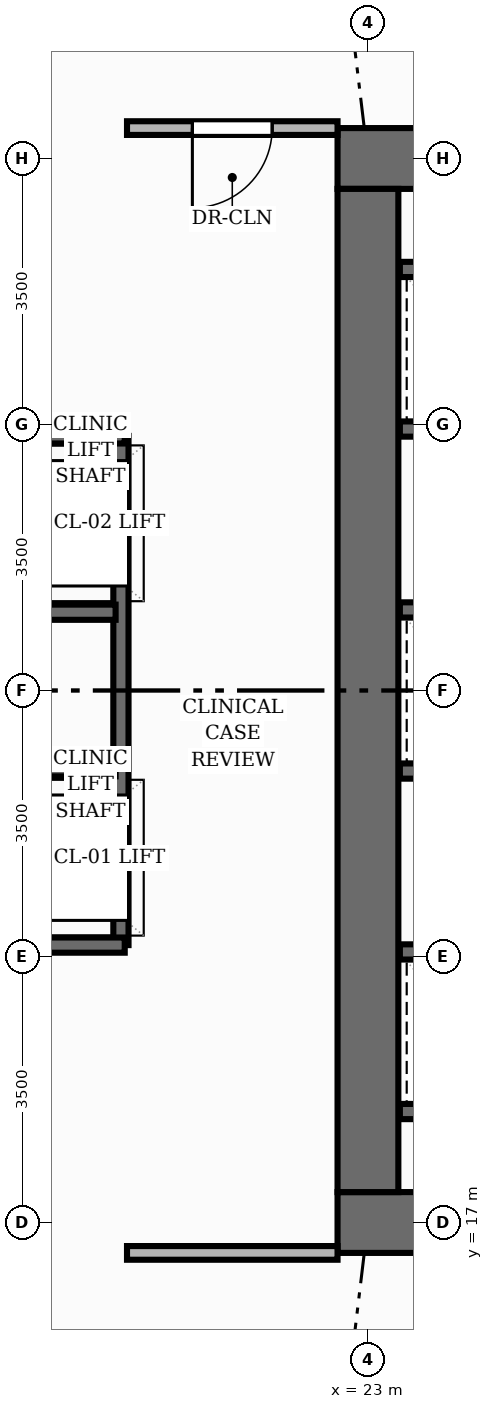
"""IFC4 building model, lengths in metres.
Left out: names, types, materials, properties, quantities, classifications, styles, units other than length and angle.
Written with IfcOpenShell. Run it as: python <this file> out.ifc"""

import sys

from ifc_helpers import new_model, si_unit, direction, frame, frame_2d, origin, place, context, subcontext, project, spatial, rectangle, extrude, element, fill, save


model = new_model("IFC4")
c1 = context("Model", 3, precision=1e-05, world=origin(), true_north=direction((0.0, 1.0)))
c2 = subcontext(c1, "Body", "Model", "MODEL_VIEW")
j1 = project(units=[si_unit("LENGTHUNIT", "METRE"), si_unit("PLANEANGLEUNIT", "RADIAN")], contexts=[c1])
p1 = place(None, origin())
s1 = spatial("IfcSite", under=j1, at=p1, CompositionType="ELEMENT")
p2 = place(p1, origin())
s2 = spatial("IfcBuilding", under=s1, at=p2, CompositionType="ELEMENT")
p3 = place(p2, frame((0.0, 0.0, 20.0)))
s3 = spatial("IfcBuildingStorey", under=s2, at=p3, CompositionType="ELEMENT", Elevation=20.0)
p4 = place(p3, frame((22.6, 17.0, 0.0), z_axis=(0.0, 0.0, 1.0), x_axis=(1.0, 0.0, 0.0)))
e1 = element("IfcWall", 1, at=p4, inside=s3, PredefinedType="SHEAR", context=c2, shape_type="SweptSolid", body=[
    extrude(rectangle(XDim=18.8, YDim=0.8, at=frame_2d((9.4, 0.0))), origin(), (0.0, 0.0, 1.0), 4.8),
])
p5 = place(p4, frame((5.9, 0.0, 0.0)))
e2 = element("IfcOpeningElement", 2, at=p5, cuts=e1, PredefinedType="OPENING", context=c2, shape_type="SweptSolid", body=[
    extrude(rectangle(XDim=1.1, YDim=2.15, at=frame_2d((0.55, 1.075))), frame((0.0, 0.41, 0.0), z_axis=(0.0, -1.0, 0.0), x_axis=(1.0, 0.0, 0.0)), (0.0, 0.0, 1.0), 0.82),
])
p6 = place(p4, frame((9.45, 0.0, 0.0)))
e3 = element("IfcOpeningElement", 3, at=p6, cuts=e1, PredefinedType="OPENING", context=c2, shape_type="SweptSolid", body=[
    extrude(rectangle(XDim=0.9, YDim=2.1, at=frame_2d((0.45, 1.05))), frame((0.0, 0.41, 0.0), z_axis=(0.0, -1.0, 0.0), x_axis=(1.0, 0.0, 0.0)), (0.0, 0.0, 1.0), 0.82),
])
p7 = place(p3, frame((22.6, 31.0, 0.0), z_axis=(0.0, 0.0, 1.0), x_axis=(1.0, 0.0, 0.0)))
e4 = element("IfcWall", 4, at=p7, inside=s3, PredefinedType="SHEAR", context=c2, shape_type="SweptSolid", body=[
    extrude(rectangle(XDim=18.8, YDim=0.8, at=frame_2d((9.4, 0.0))), origin(), (0.0, 0.0, 1.0), 4.8),
])
p8 = place(p7, frame((11.8, 0.0, 0.0)))
e5 = element("IfcOpeningElement", 5, at=p8, cuts=e4, PredefinedType="OPENING", context=c2, shape_type="SweptSolid", body=[
    extrude(rectangle(XDim=1.1, YDim=2.15, at=frame_2d((0.55, 1.075))), frame((0.0, 0.41, 0.0), z_axis=(0.0, -1.0, 0.0), x_axis=(1.0, 0.0, 0.0)), (0.0, 0.0, 1.0), 0.82),
])
p9 = place(p3, frame((23.0, 17.4, 0.0), z_axis=(0.0, 0.0, 1.0), x_axis=(0.0, 1.0, 0.0)))
e6 = element("IfcWall", 6, at=p9, inside=s3, PredefinedType="SHEAR", context=c2, shape_type="SweptSolid", body=[
    extrude(rectangle(XDim=13.2, YDim=0.8, at=frame_2d((6.6, 0.0))), origin(), (0.0, 0.0, 1.0), 4.8),
])
for number, where, z_axis, x_axis in (
    (7, (23.42, 18.46, 0.0), (0.0, 0.0, 1.0), (1.0, 0.0, 0.0)),
    (8, (23.42, 29.54, 0.0), (0.0, 0.0, 1.0), (1.0, 0.0, 0.0)),
    (9, (23.42, 20.56, 0.0), (0.0, 0.0, 1.0), (1.0, 0.0, 0.0)),
    (10, (23.42, 22.94, 0.0), (0.0, 0.0, 1.0), (1.0, 0.0, 0.0)),
    (11, (23.42, 25.06, 0.0), (0.0, 0.0, 1.0), (1.0, 0.0, 0.0)),
    (12, (23.42, 27.44, 0.0), (0.0, 0.0, 1.0), (1.0, 0.0, 0.0)),
):
    element("IfcWall", number, at=place(p3, frame(where, z_axis=z_axis, x_axis=x_axis)), inside=s3, PredefinedType="SHEAR", context=c2, shape_type="SweptSolid", body=[
        extrude(rectangle(XDim=1.71, YDim=0.2, at=frame_2d((0.855, 0.0))), origin(), (0.0, 0.0, 1.0), 4.8),
    ])
p10 = place(p3, frame((19.75, 20.65, 0.0), z_axis=(0.0, 0.0, 1.0), x_axis=(0.0, 1.0, 0.0)))
e13 = element("IfcWall", 13, at=p10, inside=s3, PredefinedType="SHEAR", context=c2, shape_type="SweptSolid", body=[
    extrude(rectangle(XDim=6.7, YDim=0.2, at=frame_2d((3.35, 0.0))), origin(), (0.0, 0.0, 1.0), 4.8),
])
for number, where, z_axis, x_axis in (
    (14, (17.8, 20.65, 0.0), (0.0, 0.0, 1.0), (1.0, 0.0, 0.0)),
    (15, (17.8, 27.35, 0.0), (0.0, 0.0, 1.0), (1.0, 0.0, 0.0)),
):
    element("IfcWall", number, at=place(p3, frame(where, z_axis=z_axis, x_axis=x_axis)), inside=s3, PredefinedType="SHEAR", context=c2, shape_type="SweptSolid", body=[
        extrude(rectangle(XDim=2.0, YDim=0.2, at=frame_2d((1.0, 0.0))), origin(), (0.0, 0.0, 1.0), 4.8),
    ])
for number, where, z_axis, x_axis in (
    (16, (17.92, 22.97, 0.0), (0.0, 0.0, 1.0), (1.0, 0.0, 0.0)),
    (17, (17.92, 25.03, 0.0), (0.0, 0.0, 1.0), (1.0, 0.0, 0.0)),
):
    element("IfcWall", number, at=place(p3, frame(where, z_axis=z_axis, x_axis=x_axis)), inside=s3, PredefinedType="SHEAR", context=c2, shape_type="SweptSolid", body=[
        extrude(rectangle(XDim=1.76, YDim=0.2, at=frame_2d((0.88, 0.0))), origin(), (0.0, 0.0, 1.0), 4.8),
    ])
p11 = place(p3, frame((22.6, 31.4, 0.0), z_axis=(0.0, 0.0, 1.0), x_axis=(-1.0, 0.0, 0.0)))
e18 = element("IfcWall", 18, at=p11, inside=s3, PredefinedType="PARTITIONING", context=c2, shape_type="SweptSolid", body=[
    extrude(rectangle(XDim=2.77, YDim=0.18, at=frame_2d((1.385, 0.0))), origin(), (0.0, 0.0, 1.0), 2.588),
])
p12 = place(p11, frame((0.86, 0.0, 0.0)))
e19 = element("IfcOpeningElement", 19, at=p12, cuts=e18, PredefinedType="OPENING", context=c2, shape_type="SweptSolid", body=[
    extrude(rectangle(XDim=1.05, YDim=2.15, at=frame_2d((0.525, 1.075))), frame((0.0, 0.1, 0.0), z_axis=(0.0, -1.0, 0.0), x_axis=(1.0, 0.0, 0.0)), (0.0, 0.0, 1.0), 0.2),
])
p13 = place(p3, frame((19.83, 16.6, 0.0), z_axis=(0.0, 0.0, 1.0), x_axis=(1.0, 0.0, 0.0)))
e20 = element("IfcWall", 20, at=p13, inside=s3, PredefinedType="PARTITIONING", context=c2, shape_type="SweptSolid", body=[
    extrude(rectangle(XDim=2.77, YDim=0.18, at=frame_2d((1.385, 0.0))), origin(), (0.0, 0.0, 1.0), 2.588),
])
p14 = place(p12, origin())
e21 = element("IfcDoor", 21, at=p14, inside=s3, OperationType="SINGLE_SWING_RIGHT", PredefinedType="DOOR", context=c2, shape_type="SweptSolid", body=[
    extrude(rectangle(XDim=1.05, YDim=2.15, at=frame_2d((0.525, 1.075))), frame((0.0, 0.025, 0.0), z_axis=(0.0, -1.0, 0.0), x_axis=(1.0, 0.0, 0.0)), (0.0, 0.0, 1.0), 0.05),
])
fill(e19, e21)
save(model, sys.argv[1])
